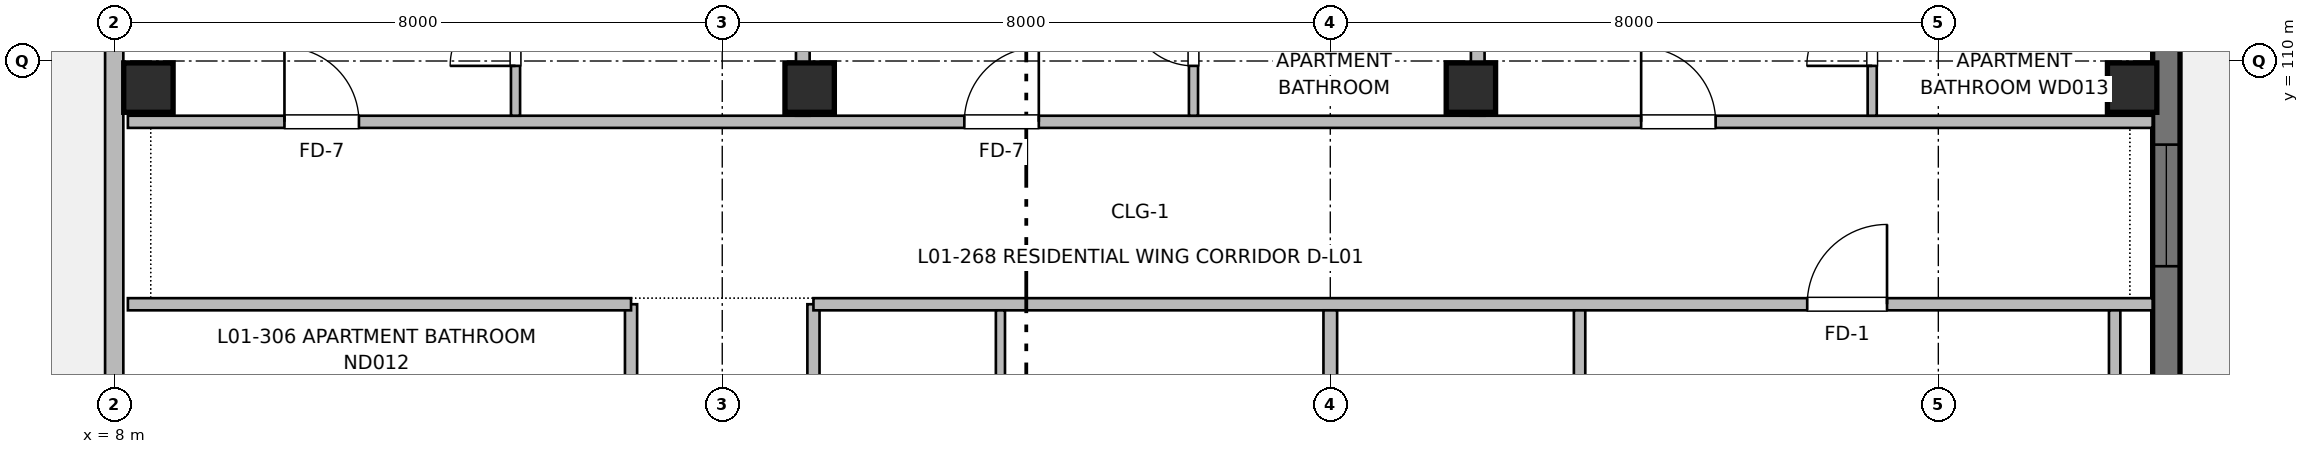
"""IFC4 building model, lengths in metres.
Left out: names, types, materials, properties, quantities, classifications, styles, units other than length and angle.
Written with IfcOpenShell. Run it as: python <this file> out.ifc"""

import sys

from ifc_helpers import new_model, si_unit, direction, frame, frame_2d, origin, origin_2d, place, context, subcontext, project, spatial, rectangle, extrude, element, fill, save


model = new_model("IFC4")
c1 = context("Model", 3, precision=1e-05, world=origin(), true_north=direction((0.0, 1.0)))
c2 = subcontext(c1, "Body", "Model", "MODEL_VIEW")
j1 = project(units=[si_unit("LENGTHUNIT", "METRE"), si_unit("PLANEANGLEUNIT", "RADIAN")], contexts=[c1])
p1 = place(None, origin())
s1 = spatial("IfcSite", under=j1, at=p1, CompositionType="ELEMENT")
p2 = place(p1, origin())
s2 = spatial("IfcBuilding", under=s1, at=p2, CompositionType="ELEMENT")
p3 = place(p2, frame((0.0, 0.0, 4.16)))
s3 = spatial("IfcBuildingStorey", under=s2, at=p3, CompositionType="ELEMENT", Elevation=4.16)
for number, where, z_axis, x_axis in (
    (1, (8.45, 109.65, 0.0), (0.0, 0.0, 1.0), (1.0, 0.0, 0.0)),
    (2, (17.15, 109.65, 0.0), (0.0, 0.0, 1.0), (1.0, 0.0, 0.0)),
    (3, (25.85, 109.65, 0.0), (0.0, 0.0, 1.0), (1.0, 0.0, 0.0)),
    (4, (34.55, 109.65, 0.0), (0.0, 0.0, 1.0), (1.0, 0.0, 0.0)),
):
    element("IfcColumn", number, at=place(p3, frame(where, z_axis=z_axis, x_axis=x_axis)), inside=s3, PredefinedType="COLUMN", context=c2, shape_type="SweptSolid", body=[
        extrude(rectangle(XDim=0.65, YDim=0.65, at=origin_2d()), origin(), (0.0, 0.0, 1.0), 3.2),
    ])
p4 = place(p3, frame((35.0, 116.0, 0.0), z_axis=(0.0, 0.0, 1.0), x_axis=(0.0, -1.0, 0.0)))
e5 = element("IfcWall", 5, at=p4, inside=s3, PredefinedType="SHEAR", context=c2, shape_type="SweptSolid", body=[
    extrude(rectangle(XDim=16.0, YDim=0.36, at=frame_2d((8.0, 0.0))), origin(), (0.0, 0.0, 1.0), 2.98),
])
p5 = place(p4, frame((2.95, 0.0, 0.0)))
e6 = element("IfcOpeningElement", 6, at=p5, cuts=e5, PredefinedType="OPENING", context=c2, shape_type="SweptSolid", body=[
    extrude(rectangle(XDim=1.2, YDim=2.2, at=frame_2d((0.6, 1.1))), frame((0.0, 0.19, 0.0), z_axis=(0.0, -1.0, 0.0), x_axis=(1.0, 0.0, 0.0)), (0.0, 0.0, 1.0), 0.38),
])
p6 = place(p4, frame((7.1, 0.0, 0.77)))
e7 = element("IfcOpeningElement", 7, at=p6, cuts=e5, PredefinedType="OPENING", context=c2, shape_type="SweptSolid", body=[
    extrude(rectangle(XDim=1.6, YDim=1.45, at=frame_2d((0.8, 0.725))), frame((0.0, 0.19, 0.0), z_axis=(0.0, -1.0, 0.0), x_axis=(1.0, 0.0, 0.0)), (0.0, 0.0, 1.0), 0.38),
])
p7 = place(p4, frame((11.2, 0.0, 0.77)))
e8 = element("IfcOpeningElement", 8, at=p7, cuts=e5, PredefinedType="OPENING", context=c2, shape_type="SweptSolid", body=[
    extrude(rectangle(XDim=1.6, YDim=1.45, at=frame_2d((0.8, 0.725))), frame((0.0, 0.19, 0.0), z_axis=(0.0, -1.0, 0.0), x_axis=(1.0, 0.0, 0.0)), (0.0, 0.0, 1.0), 0.38),
])
p8 = place(p3, frame((8.0, 56.0, 0.0), z_axis=(0.0, 0.0, 1.0), x_axis=(0.0, 1.0, 0.0)))
e9 = element("IfcWall", 9, at=p8, inside=s3, PredefinedType="SOLIDWALL", context=c2, shape_type="SweptSolid", body=[
    extrude(rectangle(XDim=60.0, YDim=0.24, at=frame_2d((30.0, 0.0))), origin(), (0.0, 0.0, 1.0), 2.98),
])
p9 = place(p8, frame((4.886, 0.0, 0.0)))
e10 = element("IfcOpeningElement", 10, at=p9, cuts=e9, PredefinedType="OPENING", context=c2, shape_type="SweptSolid", body=[
    extrude(rectangle(XDim=1.2, YDim=2.2, at=frame_2d((0.6, 1.1))), frame((0.0, 0.13, 0.0), z_axis=(0.0, -1.0, 0.0), x_axis=(1.0, 0.0, 0.0)), (0.0, 0.0, 1.0), 0.26),
])
p10 = place(p8, frame((12.057, 0.0, 0.77)))
e11 = element("IfcOpeningElement", 11, at=p10, cuts=e9, PredefinedType="OPENING", context=c2, shape_type="SweptSolid", body=[
    extrude(rectangle(XDim=1.6, YDim=1.45, at=frame_2d((0.8, 0.725))), frame((0.0, 0.13, 0.0), z_axis=(0.0, -1.0, 0.0), x_axis=(1.0, 0.0, 0.0)), (0.0, 0.0, 1.0), 0.26),
])
p11 = place(p8, frame((18.929, 0.0, 0.72)))
e12 = element("IfcOpeningElement", 12, at=p11, cuts=e9, PredefinedType="OPENING", context=c2, shape_type="SweptSolid", body=[
    extrude(rectangle(XDim=2.4, YDim=1.5, at=frame_2d((1.2, 0.75))), frame((0.0, 0.13, 0.0), z_axis=(0.0, -1.0, 0.0), x_axis=(1.0, 0.0, 0.0)), (0.0, 0.0, 1.0), 0.26),
])
p12 = place(p8, frame((29.25, 0.0, 0.82)))
e13 = element("IfcOpeningElement", 13, at=p12, cuts=e9, PredefinedType="OPENING", context=c2, shape_type="SweptSolid", body=[
    extrude(rectangle(XDim=1.5, YDim=1.4, at=frame_2d((0.75, 0.7))), frame((0.0, 0.13, 0.0), z_axis=(0.0, -1.0, 0.0), x_axis=(1.0, 0.0, 0.0)), (0.0, 0.0, 1.0), 0.26),
])
p13 = place(p8, frame((37.796, 0.0, 0.82)))
e14 = element("IfcOpeningElement", 14, at=p13, cuts=e9, PredefinedType="OPENING", context=c2, shape_type="SweptSolid", body=[
    extrude(rectangle(XDim=1.55, YDim=1.4, at=frame_2d((0.775, 0.7))), frame((0.0, 0.13, 0.0), z_axis=(0.0, -1.0, 0.0), x_axis=(1.0, 0.0, 0.0)), (0.0, 0.0, 1.0), 0.26),
])
p14 = place(p8, frame((46.443, 0.0, 0.87)))
e15 = element("IfcOpeningElement", 15, at=p14, cuts=e9, PredefinedType="OPENING", context=c2, shape_type="SweptSolid", body=[
    extrude(rectangle(XDim=1.4, YDim=1.35, at=frame_2d((0.7, 0.675))), frame((0.0, 0.13, 0.0), z_axis=(0.0, -1.0, 0.0), x_axis=(1.0, 0.0, 0.0)), (0.0, 0.0, 1.0), 0.26),
])
p15 = place(p8, frame((55.539, 0.0, 0.87)))
e16 = element("IfcOpeningElement", 16, at=p15, cuts=e9, PredefinedType="OPENING", context=c2, shape_type="SweptSolid", body=[
    extrude(rectangle(XDim=1.25, YDim=1.35, at=frame_2d((0.625, 0.675))), frame((0.0, 0.13, 0.0), z_axis=(0.0, -1.0, 0.0), x_axis=(1.0, 0.0, 0.0)), (0.0, 0.0, 1.0), 0.26),
])
p16 = place(p3, frame((14.8, 56.18, 0.0), z_axis=(0.0, 0.0, 1.0), x_axis=(0.0, 1.0, 0.0)))
e17 = element("IfcWall", 17, at=p16, inside=s3, PredefinedType="PARTITIONING", context=c2, shape_type="SweptSolid", body=[
    extrude(rectangle(XDim=50.62, YDim=0.16, at=frame_2d((25.31, 0.0))), origin(), (0.0, 0.0, 1.0), 2.935),
])
p17 = place(p16, frame((12.82, 0.0, 0.0)))
e18 = element("IfcOpeningElement", 18, at=p17, cuts=e17, PredefinedType="OPENING", context=c2, shape_type="SweptSolid", body=[
    extrude(rectangle(XDim=1.1, YDim=2.15, at=frame_2d((0.55, 1.075))), frame((0.0, 0.09, 0.0), z_axis=(0.0, -1.0, 0.0), x_axis=(1.0, 0.0, 0.0)), (0.0, 0.0, 1.0), 0.18),
])
p18 = place(p16, frame((19.22, 0.0, 0.0)))
e19 = element("IfcOpeningElement", 19, at=p18, cuts=e17, PredefinedType="OPENING", context=c2, shape_type="SweptSolid", body=[
    extrude(rectangle(XDim=1.6, YDim=2.15, at=frame_2d((0.8, 1.075))), frame((0.0, 0.09, 0.0), z_axis=(0.0, -1.0, 0.0), x_axis=(1.0, 0.0, 0.0)), (0.0, 0.0, 1.0), 0.18),
])
p19 = place(p16, frame((1.8, 0.0, 0.0)))
e20 = element("IfcOpeningElement", 20, at=p19, cuts=e17, PredefinedType="OPENING", context=c2, shape_type="SweptSolid", body=[
    extrude(rectangle(XDim=0.96, YDim=2.15, at=frame_2d((0.48, 1.075))), frame((0.0, 0.09, 0.0), z_axis=(0.0, -1.0, 0.0), x_axis=(1.0, 0.0, 0.0)), (0.0, 0.0, 1.0), 0.18),
])
p20 = place(p16, frame((32.725, 0.0, 0.0)))
e21 = element("IfcOpeningElement", 21, at=p20, cuts=e17, PredefinedType="OPENING", context=c2, shape_type="SweptSolid", body=[
    extrude(rectangle(XDim=0.98, YDim=2.15, at=frame_2d((0.49, 1.075))), frame((0.0, 0.09, 0.0), z_axis=(0.0, -1.0, 0.0), x_axis=(1.0, 0.0, 0.0)), (0.0, 0.0, 1.0), 0.18),
])
p21 = place(p16, frame((40.935, 0.0, 0.0)))
e22 = element("IfcOpeningElement", 22, at=p21, cuts=e17, PredefinedType="OPENING", context=c2, shape_type="SweptSolid", body=[
    extrude(rectangle(XDim=0.98, YDim=2.15, at=frame_2d((0.49, 1.075))), frame((0.0, 0.09, 0.0), z_axis=(0.0, -1.0, 0.0), x_axis=(1.0, 0.0, 0.0)), (0.0, 0.0, 1.0), 0.18),
])
p22 = place(p3, frame((17.2, 56.18, 0.0), z_axis=(0.0, 0.0, 1.0), x_axis=(0.0, 1.0, 0.0)))
e23 = element("IfcWall", 23, at=p22, inside=s3, PredefinedType="PARTITIONING", context=c2, shape_type="SweptSolid", body=[
    extrude(rectangle(XDim=50.62, YDim=0.16, at=frame_2d((25.31, 0.0))), origin(), (0.0, 0.0, 1.0), 2.935),
])
p23 = place(p22, frame((6.29, 0.0, 0.0)))
e24 = element("IfcOpeningElement", 24, at=p23, cuts=e23, PredefinedType="OPENING", context=c2, shape_type="SweptSolid", body=[
    extrude(rectangle(XDim=0.98, YDim=2.15, at=frame_2d((0.49, 1.075))), frame((0.0, 0.09, 0.0), z_axis=(0.0, -1.0, 0.0), x_axis=(1.0, 0.0, 0.0)), (0.0, 0.0, 1.0), 0.18),
])
p24 = place(p22, frame((19.4, 0.0, 0.0)))
e25 = element("IfcOpeningElement", 25, at=p24, cuts=e23, PredefinedType="OPENING", context=c2, shape_type="SweptSolid", body=[
    extrude(rectangle(XDim=1.02, YDim=2.15, at=frame_2d((0.51, 1.075))), frame((0.0, 0.09, 0.0), z_axis=(0.0, -1.0, 0.0), x_axis=(1.0, 0.0, 0.0)), (0.0, 0.0, 1.0), 0.18),
])
p25 = place(p22, frame((33.08, 0.0, 0.0)))
e26 = element("IfcOpeningElement", 26, at=p25, cuts=e23, PredefinedType="OPENING", context=c2, shape_type="SweptSolid", body=[
    extrude(rectangle(XDim=0.98, YDim=2.15, at=frame_2d((0.49, 1.075))), frame((0.0, 0.09, 0.0), z_axis=(0.0, -1.0, 0.0), x_axis=(1.0, 0.0, 0.0)), (0.0, 0.0, 1.0), 0.18),
])
p26 = place(p22, frame((45.33, 0.0, 0.0)))
e27 = element("IfcOpeningElement", 27, at=p26, cuts=e23, PredefinedType="OPENING", context=c2, shape_type="SweptSolid", body=[
    extrude(rectangle(XDim=0.98, YDim=2.15, at=frame_2d((0.49, 1.075))), frame((0.0, 0.09, 0.0), z_axis=(0.0, -1.0, 0.0), x_axis=(1.0, 0.0, 0.0)), (0.0, 0.0, 1.0), 0.18),
])
p27 = place(p3, frame((8.18, 106.8, 0.0), z_axis=(0.0, 0.0, 1.0), x_axis=(1.0, 0.0, 0.0)))
e28 = element("IfcWall", 28, at=p27, inside=s3, PredefinedType="PARTITIONING", context=c2, shape_type="SweptSolid", body=[
    extrude(rectangle(XDim=6.62, YDim=0.16, at=frame_2d((3.31, 0.0))), origin(), (0.0, 0.0, 1.0), 2.935),
])
p28 = place(p3, frame((17.2, 106.8, 0.0), z_axis=(0.0, 0.0, 1.0), x_axis=(1.0, 0.0, 0.0)))
e29 = element("IfcWall", 29, at=p28, inside=s3, PredefinedType="PARTITIONING", context=c2, shape_type="SweptSolid", body=[
    extrude(rectangle(XDim=17.62, YDim=0.16, at=frame_2d((8.81, 0.0))), origin(), (0.0, 0.0, 1.0), 2.935),
])
p29 = place(p28, frame((13.075, 0.0, 0.0)))
e30 = element("IfcOpeningElement", 30, at=p29, cuts=e29, PredefinedType="OPENING", context=c2, shape_type="SweptSolid", body=[
    extrude(rectangle(XDim=1.05, YDim=2.15, at=frame_2d((0.525, 1.075))), frame((0.0, 0.09, 0.0), z_axis=(0.0, -1.0, 0.0), x_axis=(1.0, 0.0, 0.0)), (0.0, 0.0, 1.0), 0.18),
])
p30 = place(p3, frame((8.18, 109.2, 0.0), z_axis=(0.0, 0.0, 1.0), x_axis=(1.0, 0.0, 0.0)))
e31 = element("IfcWall", 31, at=p30, inside=s3, PredefinedType="PARTITIONING", context=c2, shape_type="SweptSolid", body=[
    extrude(rectangle(XDim=26.64, YDim=0.16, at=frame_2d((13.32, 0.0))), origin(), (0.0, 0.0, 1.0), 2.935),
])
p31 = place(p30, frame((2.06, 0.0, 0.0)))
e32 = element("IfcOpeningElement", 32, at=p31, cuts=e31, PredefinedType="OPENING", context=c2, shape_type="SweptSolid", body=[
    extrude(rectangle(XDim=0.98, YDim=2.15, at=frame_2d((0.49, 1.075))), frame((0.0, 0.09, 0.0), z_axis=(0.0, -1.0, 0.0), x_axis=(1.0, 0.0, 0.0)), (0.0, 0.0, 1.0), 0.18),
])
p32 = place(p30, frame((11.005, 0.0, 0.0)))
e33 = element("IfcOpeningElement", 33, at=p32, cuts=e31, PredefinedType="OPENING", context=c2, shape_type="SweptSolid", body=[
    extrude(rectangle(XDim=0.98, YDim=2.15, at=frame_2d((0.49, 1.075))), frame((0.0, 0.09, 0.0), z_axis=(0.0, -1.0, 0.0), x_axis=(1.0, 0.0, 0.0)), (0.0, 0.0, 1.0), 0.18),
])
p33 = place(p30, frame((19.91, 0.0, 0.0)))
e34 = element("IfcOpeningElement", 34, at=p33, cuts=e31, PredefinedType="OPENING", context=c2, shape_type="SweptSolid", body=[
    extrude(rectangle(XDim=0.98, YDim=2.15, at=frame_2d((0.49, 1.075))), frame((0.0, 0.09, 0.0), z_axis=(0.0, -1.0, 0.0), x_axis=(1.0, 0.0, 0.0)), (0.0, 0.0, 1.0), 0.18),
])
p34 = place(p3, frame((24.0, 100.05, 0.0), z_axis=(0.0, 0.0, 1.0), x_axis=(0.0, 1.0, 0.0)))
e35 = element("IfcWall", 35, at=p34, inside=s3, PredefinedType="PARTITIONING", context=c2, shape_type="SweptSolid", body=[
    extrude(rectangle(XDim=6.67, YDim=0.18, at=frame_2d((3.335, 0.0))), origin(), (0.0, 0.0, 1.0), 2.935),
])
for number, where, z_axis, x_axis in (
    (36, (27.28, 103.99, 0.0), (0.0, 0.0, 1.0), (0.0, 1.0, 0.0)),
    (37, (34.32, 103.99, 0.0), (0.0, 0.0, 1.0), (0.0, 1.0, 0.0)),
):
    element("IfcWall", number, at=place(p3, frame(where, z_axis=z_axis, x_axis=x_axis)), inside=s3, PredefinedType="PARTITIONING", context=c2, shape_type="SweptSolid", body=[
        extrude(rectangle(XDim=2.73, YDim=0.15, at=frame_2d((1.365, 0.0))), origin(), (0.0, 0.0, 1.0), 2.935),
    ])
p35 = place(p3, frame((19.66, 95.69, 0.0), z_axis=(0.0, 0.0, 1.0), x_axis=(0.0, 1.0, 0.0)))
e38 = element("IfcWall", 38, at=p35, inside=s3, PredefinedType="PARTITIONING", context=c2, shape_type="SweptSolid", body=[
    extrude(rectangle(XDim=11.03, YDim=0.12, at=frame_2d((5.515, 0.0))), origin(), (0.0, 0.0, 1.0), 2.935),
])
p36 = place(p35, frame((1.927, 0.0, 0.0)))
e39 = element("IfcOpeningElement", 39, at=p36, cuts=e38, PredefinedType="OPENING", context=c2, shape_type="SweptSolid", body=[
    extrude(rectangle(XDim=0.86, YDim=2.1, at=frame_2d((0.43, 1.05))), frame((0.0, 0.07, 0.0), z_axis=(0.0, -1.0, 0.0), x_axis=(1.0, 0.0, 0.0)), (0.0, 0.0, 1.0), 0.14),
])
p37 = place(p35, frame((6.739, 0.0, 0.0)))
e40 = element("IfcOpeningElement", 40, at=p37, cuts=e38, PredefinedType="OPENING", context=c2, shape_type="SweptSolid", body=[
    extrude(rectangle(XDim=0.92, YDim=2.1, at=frame_2d((0.46, 1.05))), frame((0.0, 0.07, 0.0), z_axis=(0.0, -1.0, 0.0), x_axis=(1.0, 0.0, 0.0)), (0.0, 0.0, 1.0), 0.14),
])
for number, where, z_axis, x_axis in (
    (41, (17.06, 109.28, 0.0), (0.0, 0.0, 1.0), (0.0, 1.0, 0.0)),
    (42, (25.94, 109.28, 0.0), (0.0, 0.0, 1.0), (0.0, 1.0, 0.0)),
):
    element("IfcWall", number, at=place(p3, frame(where, z_axis=z_axis, x_axis=x_axis)), inside=s3, PredefinedType="PARTITIONING", context=c2, shape_type="SweptSolid", body=[
        extrude(rectangle(XDim=6.6, YDim=0.18, at=frame_2d((3.3, 0.0))), origin(), (0.0, 0.0, 1.0), 2.68),
    ])
p38 = place(p3, frame((13.28, 109.28, 0.0), z_axis=(0.0, 0.0, 1.0), x_axis=(0.0, 1.0, 0.0)))
e43 = element("IfcWall", 43, at=p38, inside=s3, PredefinedType="PARTITIONING", context=c2, shape_type="SweptSolid", body=[
    extrude(rectangle(XDim=6.6, YDim=0.12, at=frame_2d((3.3, 0.0))), origin(), (0.0, 0.0, 1.0), 2.935),
])
p39 = place(p38, frame((0.656, 0.0, 0.0)))
e44 = element("IfcOpeningElement", 44, at=p39, cuts=e43, PredefinedType="OPENING", context=c2, shape_type="SweptSolid", body=[
    extrude(rectangle(XDim=0.86, YDim=2.1, at=frame_2d((0.43, 1.05))), frame((0.0, 0.07, 0.0), z_axis=(0.0, -1.0, 0.0), x_axis=(1.0, 0.0, 0.0)), (0.0, 0.0, 1.0), 0.14),
])
p40 = place(p38, frame((4.097, 0.0, 0.0)))
e45 = element("IfcOpeningElement", 45, at=p40, cuts=e43, PredefinedType="OPENING", context=c2, shape_type="SweptSolid", body=[
    extrude(rectangle(XDim=0.9, YDim=2.1, at=frame_2d((0.45, 1.05))), frame((0.0, 0.07, 0.0), z_axis=(0.0, -1.0, 0.0), x_axis=(1.0, 0.0, 0.0)), (0.0, 0.0, 1.0), 0.14),
])
p41 = place(p3, frame((22.2, 109.28, 0.0), z_axis=(0.0, 0.0, 1.0), x_axis=(0.0, 1.0, 0.0)))
e46 = element("IfcWall", 46, at=p41, inside=s3, PredefinedType="PARTITIONING", context=c2, shape_type="SweptSolid", body=[
    extrude(rectangle(XDim=6.6, YDim=0.12, at=frame_2d((3.3, 0.0))), origin(), (0.0, 0.0, 1.0), 2.935),
])
p42 = place(p41, frame((0.656, 0.0, 0.0)))
e47 = element("IfcOpeningElement", 47, at=p42, cuts=e46, PredefinedType="OPENING", context=c2, shape_type="SweptSolid", body=[
    extrude(rectangle(XDim=0.86, YDim=2.1, at=frame_2d((0.43, 1.05))), frame((0.0, 0.07, 0.0), z_axis=(0.0, -1.0, 0.0), x_axis=(1.0, 0.0, 0.0)), (0.0, 0.0, 1.0), 0.14),
])
p43 = place(p41, frame((4.097, 0.0, 0.0)))
e48 = element("IfcOpeningElement", 48, at=p43, cuts=e46, PredefinedType="OPENING", context=c2, shape_type="SweptSolid", body=[
    extrude(rectangle(XDim=0.9, YDim=2.1, at=frame_2d((0.45, 1.05))), frame((0.0, 0.07, 0.0), z_axis=(0.0, -1.0, 0.0), x_axis=(1.0, 0.0, 0.0)), (0.0, 0.0, 1.0), 0.14),
])
p44 = place(p3, frame((31.13, 109.28, 0.0), z_axis=(0.0, 0.0, 1.0), x_axis=(0.0, 1.0, 0.0)))
e49 = element("IfcWall", 49, at=p44, inside=s3, PredefinedType="PARTITIONING", context=c2, shape_type="SweptSolid", body=[
    extrude(rectangle(XDim=6.6, YDim=0.12, at=frame_2d((3.3, 0.0))), origin(), (0.0, 0.0, 1.0), 2.935),
])
p45 = place(p44, frame((0.656, 0.0, 0.0)))
e50 = element("IfcOpeningElement", 50, at=p45, cuts=e49, PredefinedType="OPENING", context=c2, shape_type="SweptSolid", body=[
    extrude(rectangle(XDim=0.86, YDim=2.1, at=frame_2d((0.43, 1.05))), frame((0.0, 0.07, 0.0), z_axis=(0.0, -1.0, 0.0), x_axis=(1.0, 0.0, 0.0)), (0.0, 0.0, 1.0), 0.14),
])
p46 = place(p44, frame((4.097, 0.0, 0.0)))
e51 = element("IfcOpeningElement", 51, at=p46, cuts=e49, PredefinedType="OPENING", context=c2, shape_type="SweptSolid", body=[
    extrude(rectangle(XDim=0.9, YDim=2.1, at=frame_2d((0.45, 1.05))), frame((0.0, 0.07, 0.0), z_axis=(0.0, -1.0, 0.0), x_axis=(1.0, 0.0, 0.0)), (0.0, 0.0, 1.0), 0.14),
])
p47 = place(p6, origin())
e52 = element("IfcWindow", 52, at=p47, inside=s3, PartitioningType="SINGLE_PANEL", PredefinedType="WINDOW", context=c2, shape_type="SweptSolid", body=[
    extrude(rectangle(XDim=1.6, YDim=1.45, at=frame_2d((0.8, 0.725))), frame((0.0, 0.03, 0.0), z_axis=(0.0, -1.0, 0.0), x_axis=(1.0, 0.0, 0.0)), (0.0, 0.0, 1.0), 0.06),
])
fill(e7, e52)
p48 = place(p29, origin())
e53 = element("IfcDoor", 53, at=p48, inside=s3, OperationType="SINGLE_SWING_RIGHT", PredefinedType="DOOR", context=c2, shape_type="SweptSolid", body=[
    extrude(rectangle(XDim=1.05, YDim=2.15, at=frame_2d((0.525, 1.075))), frame((0.0, 0.025, 0.0), z_axis=(0.0, -1.0, 0.0), x_axis=(1.0, 0.0, 0.0)), (0.0, 0.0, 1.0), 0.05),
])
fill(e30, e53)
p49 = place(p31, origin())
e54 = element("IfcDoor", 54, at=p49, inside=s3, OperationType="SINGLE_SWING_LEFT", PredefinedType="DOOR", context=c2, shape_type="SweptSolid", body=[
    extrude(rectangle(XDim=0.98, YDim=2.15, at=frame_2d((0.49, 1.075))), frame((0.0, 0.025, 0.0), z_axis=(0.0, -1.0, 0.0), x_axis=(1.0, 0.0, 0.0)), (0.0, 0.0, 1.0), 0.05),
])
fill(e32, e54)
p50 = place(p39, origin())
e55 = element("IfcDoor", 55, at=p50, inside=s3, OperationType="SINGLE_SWING_LEFT", PredefinedType="DOOR", context=c2, shape_type="SweptSolid", body=[
    extrude(rectangle(XDim=0.86, YDim=2.1, at=frame_2d((0.43, 1.05))), frame((0.0, 0.025, 0.0), z_axis=(0.0, -1.0, 0.0), x_axis=(1.0, 0.0, 0.0)), (0.0, 0.0, 1.0), 0.05),
])
fill(e44, e55)
p51 = place(p32, origin())
e56 = element("IfcDoor", 56, at=p51, inside=s3, OperationType="SINGLE_SWING_RIGHT", PredefinedType="DOOR", context=c2, shape_type="SweptSolid", body=[
    extrude(rectangle(XDim=0.98, YDim=2.15, at=frame_2d((0.49, 1.075))), frame((0.0, 0.025, 0.0), z_axis=(0.0, -1.0, 0.0), x_axis=(1.0, 0.0, 0.0)), (0.0, 0.0, 1.0), 0.05),
])
fill(e33, e56)
p52 = place(p42, origin())
e57 = element("IfcDoor", 57, at=p52, inside=s3, OperationType="SINGLE_SWING_RIGHT", PredefinedType="DOOR", context=c2, shape_type="SweptSolid", body=[
    extrude(rectangle(XDim=0.86, YDim=2.1, at=frame_2d((0.43, 1.05))), frame((0.0, 0.025, 0.0), z_axis=(0.0, -1.0, 0.0), x_axis=(1.0, 0.0, 0.0)), (0.0, 0.0, 1.0), 0.05),
])
fill(e47, e57)
p53 = place(p33, origin())
e58 = element("IfcDoor", 58, at=p53, inside=s3, OperationType="SINGLE_SWING_LEFT", PredefinedType="DOOR", context=c2, shape_type="SweptSolid", body=[
    extrude(rectangle(XDim=0.98, YDim=2.15, at=frame_2d((0.49, 1.075))), frame((0.0, 0.025, 0.0), z_axis=(0.0, -1.0, 0.0), x_axis=(1.0, 0.0, 0.0)), (0.0, 0.0, 1.0), 0.05),
])
fill(e34, e58)
p54 = place(p45, origin())
e59 = element("IfcDoor", 59, at=p54, inside=s3, OperationType="SINGLE_SWING_LEFT", PredefinedType="DOOR", context=c2, shape_type="SweptSolid", body=[
    extrude(rectangle(XDim=0.86, YDim=2.1, at=frame_2d((0.43, 1.05))), frame((0.0, 0.025, 0.0), z_axis=(0.0, -1.0, 0.0), x_axis=(1.0, 0.0, 0.0)), (0.0, 0.0, 1.0), 0.05),
])
fill(e50, e59)
save(model, sys.argv[1])
